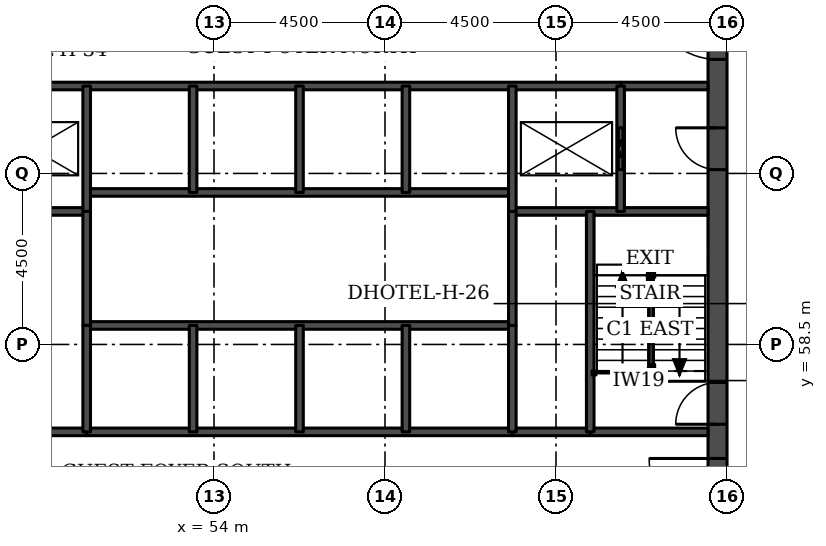
"""IFC4 building model, lengths in metres.
Left out: names, types, materials, properties, quantities, classifications, styles, units other than length and angle.
Written with IfcOpenShell. Run it as: python <this file> out.ifc"""

import sys

from ifc_helpers import new_model, si_unit, direction, frame, frame_2d, origin, place, context, subcontext, project, spatial, rectangle, extrude, element, fill, save


model = new_model("IFC4")
c1 = context("Model", 3, precision=1e-05, world=origin(), true_north=direction((0.0, 1.0)))
c2 = subcontext(c1, "Body", "Model", "MODEL_VIEW")
j1 = project(units=[si_unit("LENGTHUNIT", "METRE"), si_unit("PLANEANGLEUNIT", "RADIAN")], contexts=[c1])
p1 = place(None, origin())
s1 = spatial("IfcSite", under=j1, at=p1, CompositionType="ELEMENT")
p2 = place(p1, origin())
s2 = spatial("IfcBuilding", under=s1, at=p2, CompositionType="ELEMENT")
p3 = place(p2, frame((0.0, 0.0, 46.2)))
s3 = spatial("IfcBuildingStorey", under=s2, at=p3, CompositionType="ELEMENT", Elevation=46.2)
p4 = place(p3, frame((67.25, 49.5, 0.0), z_axis=(0.0, 0.0, 1.0), x_axis=(0.0, 1.0, 0.0)))
e1 = element("IfcWall", 1, at=p4, inside=s3, PredefinedType="SHEAR", context=c2, shape_type="SweptSolid", body=[
    extrude(rectangle(XDim=22.5, YDim=0.5, at=frame_2d((11.25, 0.0))), origin(), (0.0, 0.0, 1.0), 3.3),
])
p5 = place(p4, frame((4.2, 0.0, 0.0)))
e2 = element("IfcOpeningElement", 2, at=p5, cuts=e1, PredefinedType="OPENING", context=c2, shape_type="SweptSolid", body=[
    extrude(rectangle(XDim=1.8, YDim=2.1, at=frame_2d((0.9, 1.05))), frame((0.0, 0.26, 0.0), z_axis=(0.0, -1.0, 0.0), x_axis=(1.0, 0.0, 0.0)), (0.0, 0.0, 1.0), 0.52),
])
p6 = place(p4, frame((6.9, 0.0, 0.0)))
e3 = element("IfcOpeningElement", 3, at=p6, cuts=e1, PredefinedType="OPENING", context=c2, shape_type="SweptSolid", body=[
    extrude(rectangle(XDim=1.1, YDim=2.1, at=frame_2d((0.55, 1.05))), frame((0.0, 0.26, 0.0), z_axis=(0.0, -1.0, 0.0), x_axis=(1.0, 0.0, 0.0)), (0.0, 0.0, 1.0), 0.52),
])
p7 = place(p4, frame((13.6, 0.0, 0.0)))
e4 = element("IfcOpeningElement", 4, at=p7, cuts=e1, PredefinedType="OPENING", context=c2, shape_type="SweptSolid", body=[
    extrude(rectangle(XDim=1.1, YDim=2.1, at=frame_2d((0.55, 1.05))), frame((0.0, 0.26, 0.0), z_axis=(0.0, -1.0, 0.0), x_axis=(1.0, 0.0, 0.0)), (0.0, 0.0, 1.0), 0.52),
])
p8 = place(p4, frame((16.5, 0.0, 0.0)))
e5 = element("IfcOpeningElement", 5, at=p8, cuts=e1, PredefinedType="OPENING", context=c2, shape_type="SweptSolid", body=[
    extrude(rectangle(XDim=1.8, YDim=2.1, at=frame_2d((0.9, 1.05))), frame((0.0, 0.26, 0.0), z_axis=(0.0, -1.0, 0.0), x_axis=(1.0, 0.0, 0.0)), (0.0, 0.0, 1.0), 0.52),
])
for number, where, z_axis, x_axis in (
    (6, (48.6, 56.2, 0.0), (0.0, 0.0, 1.0), (1.0, 0.0, 0.0)),
    (7, (61.85, 56.2, 0.0), (0.0, 0.0, 1.0), (1.0, 0.0, 0.0)),
):
    element("IfcWall", number, at=place(p3, frame(where, z_axis=z_axis, x_axis=x_axis)), inside=s3, PredefinedType="SOLIDWALL", context=c2, shape_type="SweptSolid", body=[
        extrude(rectangle(XDim=2.05, YDim=0.2, at=frame_2d((1.025, 0.0))), origin(), (0.0, 0.0, 1.0), 3.08),
    ])
p9 = place(p3, frame((50.65, 56.2, 0.0), z_axis=(0.0, 0.0, 1.0), x_axis=(1.0, 0.0, 0.0)))
e8 = element("IfcWall", 8, at=p9, inside=s3, PredefinedType="SOLIDWALL", context=c2, shape_type="SweptSolid", body=[
    extrude(rectangle(XDim=11.2, YDim=0.2, at=frame_2d((5.6, 0.0))), origin(), (0.0, 0.0, 1.0), 3.08),
])
p10 = place(p3, frame((63.9, 56.2, 0.0), z_axis=(0.0, 0.0, 1.0), x_axis=(1.0, 0.0, 0.0)))
e9 = element("IfcWall", 9, at=p10, inside=s3, PredefinedType="SOLIDWALL", context=c2, shape_type="SweptSolid", body=[
    extrude(rectangle(XDim=3.1, YDim=0.2, at=frame_2d((1.55, 0.0))), origin(), (0.0, 0.0, 1.0), 3.08),
])
p11 = place(p3, frame((50.65, 59.0, 0.0), z_axis=(0.0, 0.0, 1.0), x_axis=(1.0, 0.0, 0.0)))
e10 = element("IfcWall", 10, at=p11, inside=s3, PredefinedType="SOLIDWALL", context=c2, shape_type="SweptSolid", body=[
    extrude(rectangle(XDim=11.2, YDim=0.2, at=frame_2d((5.6, 0.0))), origin(), (0.0, 0.0, 1.0), 3.3),
])
for number, where, z_axis, x_axis in (
    (11, (45.5, 62.0, 0.0), (0.0, 0.0, 1.0), (1.0, 0.0, 0.0)),
    (12, (61.85, 62.0, 0.0), (0.0, 0.0, 1.0), (1.0, 0.0, 0.0)),
):
    element("IfcWall", number, at=place(p3, frame(where, z_axis=z_axis, x_axis=x_axis)), inside=s3, PredefinedType="SOLIDWALL", context=c2, shape_type="SweptSolid", body=[
        extrude(rectangle(XDim=5.15, YDim=0.2, at=frame_2d((2.575, 0.0))), origin(), (0.0, 0.0, 1.0), 3.08),
    ])
p12 = place(p3, frame((50.65, 62.5, 0.0), z_axis=(0.0, 0.0, 1.0), x_axis=(1.0, 0.0, 0.0)))
e13 = element("IfcWall", 13, at=p12, inside=s3, PredefinedType="SOLIDWALL", context=c2, shape_type="SweptSolid", body=[
    extrude(rectangle(XDim=11.2, YDim=0.2, at=frame_2d((5.6, 0.0))), origin(), (0.0, 0.0, 1.0), 3.3),
])
p13 = place(p3, frame((64.7, 65.3, 0.0), z_axis=(0.0, 0.0, 1.0), x_axis=(1.0, 0.0, 0.0)))
e14 = element("IfcWall", 14, at=p13, inside=s3, PredefinedType="SOLIDWALL", context=c2, shape_type="SweptSolid", body=[
    extrude(rectangle(XDim=2.3, YDim=0.2, at=frame_2d((1.15, 0.0))), origin(), (0.0, 0.0, 1.0), 3.08),
])
p14 = place(p3, frame((47.8, 65.3, 0.0), z_axis=(0.0, 0.0, 1.0), x_axis=(1.0, 0.0, 0.0)))
e15 = element("IfcWall", 15, at=p14, inside=s3, PredefinedType="SOLIDWALL", context=c2, shape_type="SweptSolid", body=[
    extrude(rectangle(XDim=16.9, YDim=0.2, at=frame_2d((8.45, 0.0))), origin(), (0.0, 0.0, 1.0), 3.08),
])
p15 = place(p3, frame((50.65, 59.0, 0.0), z_axis=(0.0, 0.0, 1.0), x_axis=(0.0, 1.0, 0.0)))
e16 = element("IfcWall", 16, at=p15, inside=s3, PredefinedType="SOLIDWALL", context=c2, shape_type="SweptSolid", body=[
    extrude(rectangle(XDim=3.0, YDim=0.2, at=frame_2d((1.5, 0.0))), origin(), (0.0, 0.0, 1.0), 3.3),
])
p16 = place(p3, frame((50.65, 56.2, 0.0), z_axis=(0.0, 0.0, 1.0), x_axis=(0.0, 1.0, 0.0)))
e17 = element("IfcWall", 17, at=p16, inside=s3, PredefinedType="SOLIDWALL", context=c2, shape_type="SweptSolid", body=[
    extrude(rectangle(XDim=2.8, YDim=0.2, at=frame_2d((1.4, 0.0))), origin(), (0.0, 0.0, 1.0), 3.08),
])
p17 = place(p3, frame((50.65, 62.0, 0.0), z_axis=(0.0, 0.0, 1.0), x_axis=(0.0, 1.0, 0.0)))
e18 = element("IfcWall", 18, at=p17, inside=s3, PredefinedType="SOLIDWALL", context=c2, shape_type="SweptSolid", body=[
    extrude(rectangle(XDim=3.3, YDim=0.2, at=frame_2d((1.65, 0.0))), origin(), (0.0, 0.0, 1.0), 3.08),
])
for number, where, z_axis, x_axis in (
    (19, (53.45, 56.2, 0.0), (0.0, 0.0, 1.0), (0.0, 1.0, 0.0)),
    (20, (53.45, 62.5, 0.0), (0.0, 0.0, 1.0), (0.0, 1.0, 0.0)),
    (21, (56.25, 56.2, 0.0), (0.0, 0.0, 1.0), (0.0, 1.0, 0.0)),
    (22, (56.25, 62.5, 0.0), (0.0, 0.0, 1.0), (0.0, 1.0, 0.0)),
    (23, (59.05, 56.2, 0.0), (0.0, 0.0, 1.0), (0.0, 1.0, 0.0)),
    (24, (59.05, 62.5, 0.0), (0.0, 0.0, 1.0), (0.0, 1.0, 0.0)),
):
    element("IfcWall", number, at=place(p3, frame(where, z_axis=z_axis, x_axis=x_axis)), inside=s3, PredefinedType="SOLIDWALL", context=c2, shape_type="SweptSolid", body=[
        extrude(rectangle(XDim=2.8, YDim=0.2, at=frame_2d((1.4, 0.0))), origin(), (0.0, 0.0, 1.0), 3.08),
    ])
p18 = place(p3, frame((61.85, 59.0, 0.0), z_axis=(0.0, 0.0, 1.0), x_axis=(0.0, 1.0, 0.0)))
e25 = element("IfcWall", 25, at=p18, inside=s3, PredefinedType="SOLIDWALL", context=c2, shape_type="SweptSolid", body=[
    extrude(rectangle(XDim=3.0, YDim=0.2, at=frame_2d((1.5, 0.0))), origin(), (0.0, 0.0, 1.0), 3.3),
])
p19 = place(p3, frame((61.85, 56.2, 0.0), z_axis=(0.0, 0.0, 1.0), x_axis=(0.0, 1.0, 0.0)))
e26 = element("IfcWall", 26, at=p19, inside=s3, PredefinedType="SOLIDWALL", context=c2, shape_type="SweptSolid", body=[
    extrude(rectangle(XDim=2.8, YDim=0.2, at=frame_2d((1.4, 0.0))), origin(), (0.0, 0.0, 1.0), 3.08),
])
p20 = place(p3, frame((61.85, 62.0, 0.0), z_axis=(0.0, 0.0, 1.0), x_axis=(0.0, 1.0, 0.0)))
e27 = element("IfcWall", 27, at=p20, inside=s3, PredefinedType="SOLIDWALL", context=c2, shape_type="SweptSolid", body=[
    extrude(rectangle(XDim=3.3, YDim=0.2, at=frame_2d((1.65, 0.0))), origin(), (0.0, 0.0, 1.0), 3.08),
])
p21 = place(p3, frame((63.9, 56.2, 0.0), z_axis=(0.0, 0.0, 1.0), x_axis=(0.0, 1.0, 0.0)))
e28 = element("IfcWall", 28, at=p21, inside=s3, PredefinedType="SOLIDWALL", context=c2, shape_type="SweptSolid", body=[
    extrude(rectangle(XDim=5.8, YDim=0.2, at=frame_2d((2.9, 0.0))), origin(), (0.0, 0.0, 1.0), 3.08),
])
p22 = place(p3, frame((64.7, 62.0, 0.0), z_axis=(0.0, 0.0, 1.0), x_axis=(0.0, 1.0, 0.0)))
e29 = element("IfcWall", 29, at=p22, inside=s3, PredefinedType="SOLIDWALL", context=c2, shape_type="SweptSolid", body=[
    extrude(rectangle(XDim=3.3, YDim=0.2, at=frame_2d((1.65, 0.0))), origin(), (0.0, 0.0, 1.0), 3.08),
])
p23 = place(p22, frame((1.1, 0.0, 0.0)))
e30 = element("IfcOpeningElement", 30, at=p23, cuts=e29, PredefinedType="OPENING", context=c2, shape_type="SweptSolid", body=[
    extrude(rectangle(XDim=1.1, YDim=2.1, at=frame_2d((0.55, 1.05))), frame((0.0, 0.11, 0.0), z_axis=(0.0, -1.0, 0.0), x_axis=(1.0, 0.0, 0.0)), (0.0, 0.0, 1.0), 0.22),
])
p24 = place(p23, origin())
e31 = element("IfcDoor", 31, at=p24, inside=s3, OperationType="DOUBLE_DOOR_SLIDING", PredefinedType="DOOR", context=c2, shape_type="SweptSolid", body=[
    extrude(rectangle(XDim=1.1, YDim=2.1, at=frame_2d((0.55, 1.05))), frame((0.0, 0.025, 0.0), z_axis=(0.0, -1.0, 0.0), x_axis=(1.0, 0.0, 0.0)), (0.0, 0.0, 1.0), 0.05),
])
fill(e30, e31)
p25 = place(p5, origin())
e32 = element("IfcDoor", 32, at=p25, inside=s3, OperationType="SINGLE_SWING_RIGHT", PredefinedType="DOOR", context=c2, shape_type="SweptSolid", body=[
    extrude(rectangle(XDim=1.8, YDim=2.1, at=frame_2d((0.9, 1.05))), frame((0.0, 0.025, 0.0), z_axis=(0.0, -1.0, 0.0), x_axis=(1.0, 0.0, 0.0)), (0.0, 0.0, 1.0), 0.05),
])
fill(e2, e32)
p26 = place(p6, origin())
e33 = element("IfcDoor", 33, at=p26, inside=s3, OperationType="SINGLE_SWING_LEFT", PredefinedType="DOOR", context=c2, shape_type="SweptSolid", body=[
    extrude(rectangle(XDim=1.1, YDim=2.1, at=frame_2d((0.55, 1.05))), frame((0.0, 0.025, 0.0), z_axis=(0.0, -1.0, 0.0), x_axis=(1.0, 0.0, 0.0)), (0.0, 0.0, 1.0), 0.05),
])
fill(e3, e33)
p27 = place(p7, origin())
e34 = element("IfcDoor", 34, at=p27, inside=s3, OperationType="SINGLE_SWING_RIGHT", PredefinedType="DOOR", context=c2, shape_type="SweptSolid", body=[
    extrude(rectangle(XDim=1.1, YDim=2.1, at=frame_2d((0.55, 1.05))), frame((0.0, 0.025, 0.0), z_axis=(0.0, -1.0, 0.0), x_axis=(1.0, 0.0, 0.0)), (0.0, 0.0, 1.0), 0.05),
])
fill(e4, e34)
p28 = place(p8, origin())
e35 = element("IfcDoor", 35, at=p28, inside=s3, OperationType="SINGLE_SWING_RIGHT", PredefinedType="DOOR", context=c2, shape_type="SweptSolid", body=[
    extrude(rectangle(XDim=1.8, YDim=2.1, at=frame_2d((0.9, 1.05))), frame((0.0, 0.025, 0.0), z_axis=(0.0, -1.0, 0.0), x_axis=(1.0, 0.0, 0.0)), (0.0, 0.0, 1.0), 0.05),
])
fill(e5, e35)
save(model, sys.argv[1])
